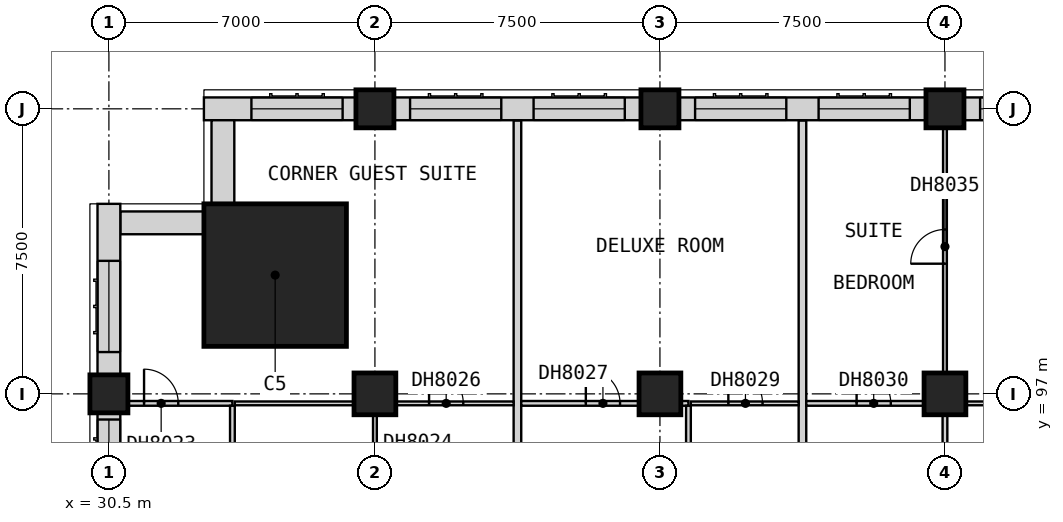
"""IFC4 building model, lengths in metres.
Left out: names, types, materials, properties, quantities, classifications, styles, units other than length and angle.
Written with IfcOpenShell. Run it as: python <this file> out.ifc"""

import sys

from ifc_helpers import new_model, si_unit, direction, frame, frame_2d, origin, origin_2d, place, context, subcontext, project, spatial, rectangle, extrude, element, fill, save


model = new_model("IFC4")
c1 = context("Model", 3, precision=1e-05, world=origin(), true_north=direction((0.0, 1.0)))
c2 = subcontext(c1, "Body", "Model", "MODEL_VIEW")
j1 = project(units=[si_unit("LENGTHUNIT", "METRE"), si_unit("PLANEANGLEUNIT", "RADIAN")], contexts=[c1])
p1 = place(None, origin())
s1 = spatial("IfcSite", under=j1, at=p1, CompositionType="ELEMENT")
p2 = place(p1, origin())
s2 = spatial("IfcBuilding", under=s1, at=p2, CompositionType="ELEMENT")
p3 = place(p2, frame((0.0, 0.0, 89.9)))
s3 = spatial("IfcBuildingStorey", under=s2, at=p3, CompositionType="ELEMENT", Elevation=89.9)
p4 = place(p3, frame((30.5, 97.0, 0.0), z_axis=(0.0, 0.0, 1.0), x_axis=(1.0, 0.0, 0.0)))
e1 = element("IfcColumn", 1, at=p4, inside=s3, PredefinedType="COLUMN", context=c2, shape_type="SweptSolid", body=[
    extrude(rectangle(XDim=1.0, YDim=1.0, at=origin_2d()), origin(), (0.0, 0.0, 1.0), 3.6),
])
p5 = place(p3, frame((37.5, 97.0, 0.0), z_axis=(0.0, 0.0, 1.0), x_axis=(1.0, 0.0, 0.0)))
e2 = element("IfcColumn", 2, at=p5, inside=s3, PredefinedType="COLUMN", context=c2, shape_type="SweptSolid", body=[
    extrude(rectangle(XDim=1.1, YDim=1.1, at=origin_2d()), origin(), (0.0, 0.0, 1.0), 3.6),
])
p6 = place(p3, frame((37.5, 104.5, 0.0), z_axis=(0.0, 0.0, 1.0), x_axis=(1.0, 0.0, 0.0)))
e3 = element("IfcColumn", 3, at=p6, inside=s3, PredefinedType="COLUMN", context=c2, shape_type="SweptSolid", body=[
    extrude(rectangle(XDim=1.0, YDim=1.0, at=origin_2d()), origin(), (0.0, 0.0, 1.0), 3.6),
])
p7 = place(p3, frame((45.0, 97.0, 0.0), z_axis=(0.0, 0.0, 1.0), x_axis=(1.0, 0.0, 0.0)))
e4 = element("IfcColumn", 4, at=p7, inside=s3, PredefinedType="COLUMN", context=c2, shape_type="SweptSolid", body=[
    extrude(rectangle(XDim=1.1, YDim=1.1, at=origin_2d()), origin(), (0.0, 0.0, 1.0), 3.6),
])
p8 = place(p3, frame((45.0, 104.5, 0.0), z_axis=(0.0, 0.0, 1.0), x_axis=(1.0, 0.0, 0.0)))
e5 = element("IfcColumn", 5, at=p8, inside=s3, PredefinedType="COLUMN", context=c2, shape_type="SweptSolid", body=[
    extrude(rectangle(XDim=1.0, YDim=1.0, at=origin_2d()), origin(), (0.0, 0.0, 1.0), 3.6),
])
p9 = place(p3, frame((52.5, 97.0, 0.0), z_axis=(0.0, 0.0, 1.0), x_axis=(1.0, 0.0, 0.0)))
e6 = element("IfcColumn", 6, at=p9, inside=s3, PredefinedType="COLUMN", context=c2, shape_type="SweptSolid", body=[
    extrude(rectangle(XDim=1.1, YDim=1.1, at=origin_2d()), origin(), (0.0, 0.0, 1.0), 3.6),
])
p10 = place(p3, frame((52.5, 104.5, 0.0), z_axis=(0.0, 0.0, 1.0), x_axis=(1.0, 0.0, 0.0)))
e7 = element("IfcColumn", 7, at=p10, inside=s3, PredefinedType="COLUMN", context=c2, shape_type="SweptSolid", body=[
    extrude(rectangle(XDim=1.0, YDim=1.0, at=origin_2d()), origin(), (0.0, 0.0, 1.0), 3.6),
])
p11 = place(p3, frame((34.875, 100.125, 0.0), z_axis=(0.0, 0.0, 1.0), x_axis=(1.0, 0.0, 0.0)))
e8 = element("IfcColumn", 8, at=p11, inside=s3, PredefinedType="COLUMN", context=c2, shape_type="SweptSolid", body=[
    extrude(rectangle(XDim=3.75, YDim=3.75, at=origin_2d()), origin(), (0.0, 0.0, 1.0), 3.6),
])
p12 = place(p3, frame((59.5, 104.5, 0.0), z_axis=(0.0, 0.0, 1.0), x_axis=(-1.0, 0.0, 0.0)))
e9 = element("IfcWall", 9, at=p12, inside=s3, PredefinedType="SOLIDWALL", context=c2, shape_type="SweptSolid", body=[
    extrude(rectangle(XDim=6.5, YDim=0.6, at=frame_2d((3.25, 0.0))), origin(), (0.0, 0.0, 1.0), 2.85),
])
p13 = place(p12, frame((3.675, 0.0, 0.8)))
e10 = element("IfcOpeningElement", 10, at=p13, cuts=e9, PredefinedType="OPENING", context=c2, shape_type="SweptSolid", body=[
    extrude(rectangle(XDim=2.4, YDim=1.8, at=frame_2d((1.2, 0.9))), frame((0.0, 0.31, 0.0), z_axis=(0.0, -1.0, 0.0), x_axis=(1.0, 0.0, 0.0)), (0.0, 0.0, 1.0), 0.62),
])
p14 = place(p12, frame((0.425, 0.0, 0.8)))
e11 = element("IfcOpeningElement", 11, at=p14, cuts=e9, PredefinedType="OPENING", context=c2, shape_type="SweptSolid", body=[
    extrude(rectangle(XDim=2.4, YDim=1.8, at=frame_2d((1.2, 0.9))), frame((0.0, 0.31, 0.0), z_axis=(0.0, -1.0, 0.0), x_axis=(1.0, 0.0, 0.0)), (0.0, 0.0, 1.0), 0.62),
])
p15 = place(p3, frame((52.0, 104.5, 0.0), z_axis=(0.0, 0.0, 1.0), x_axis=(-1.0, 0.0, 0.0)))
e12 = element("IfcWall", 12, at=p15, inside=s3, PredefinedType="SOLIDWALL", context=c2, shape_type="SweptSolid", body=[
    extrude(rectangle(XDim=6.5, YDim=0.6, at=frame_2d((3.25, 0.0))), origin(), (0.0, 0.0, 1.0), 2.85),
])
p16 = place(p15, frame((3.675, 0.0, 0.8)))
e13 = element("IfcOpeningElement", 13, at=p16, cuts=e12, PredefinedType="OPENING", context=c2, shape_type="SweptSolid", body=[
    extrude(rectangle(XDim=2.4, YDim=1.8, at=frame_2d((1.2, 0.9))), frame((0.0, 0.31, 0.0), z_axis=(0.0, -1.0, 0.0), x_axis=(1.0, 0.0, 0.0)), (0.0, 0.0, 1.0), 0.62),
])
p17 = place(p15, frame((0.425, 0.0, 0.8)))
e14 = element("IfcOpeningElement", 14, at=p17, cuts=e12, PredefinedType="OPENING", context=c2, shape_type="SweptSolid", body=[
    extrude(rectangle(XDim=2.4, YDim=1.8, at=frame_2d((1.2, 0.9))), frame((0.0, 0.31, 0.0), z_axis=(0.0, -1.0, 0.0), x_axis=(1.0, 0.0, 0.0)), (0.0, 0.0, 1.0), 0.62),
])
p18 = place(p3, frame((44.5, 104.5, 0.0), z_axis=(0.0, 0.0, 1.0), x_axis=(-1.0, 0.0, 0.0)))
e15 = element("IfcWall", 15, at=p18, inside=s3, PredefinedType="SOLIDWALL", context=c2, shape_type="SweptSolid", body=[
    extrude(rectangle(XDim=6.5, YDim=0.6, at=frame_2d((3.25, 0.0))), origin(), (0.0, 0.0, 1.0), 2.85),
])
p19 = place(p18, frame((3.675, 0.0, 0.8)))
e16 = element("IfcOpeningElement", 16, at=p19, cuts=e15, PredefinedType="OPENING", context=c2, shape_type="SweptSolid", body=[
    extrude(rectangle(XDim=2.4, YDim=1.8, at=frame_2d((1.2, 0.9))), frame((0.0, 0.31, 0.0), z_axis=(0.0, -1.0, 0.0), x_axis=(1.0, 0.0, 0.0)), (0.0, 0.0, 1.0), 0.62),
])
p20 = place(p18, frame((0.425, 0.0, 0.8)))
e17 = element("IfcOpeningElement", 17, at=p20, cuts=e15, PredefinedType="OPENING", context=c2, shape_type="SweptSolid", body=[
    extrude(rectangle(XDim=2.4, YDim=1.8, at=frame_2d((1.2, 0.9))), frame((0.0, 0.31, 0.0), z_axis=(0.0, -1.0, 0.0), x_axis=(1.0, 0.0, 0.0)), (0.0, 0.0, 1.0), 0.62),
])
p21 = place(p3, frame((37.0, 104.5, 0.0), z_axis=(0.0, 0.0, 1.0), x_axis=(-1.0, 0.0, 0.0)))
e18 = element("IfcWall", 18, at=p21, inside=s3, PredefinedType="SOLIDWALL", context=c2, shape_type="SweptSolid", body=[
    extrude(rectangle(XDim=4.0, YDim=0.6, at=frame_2d((2.0, 0.0))), origin(), (0.0, 0.0, 1.0), 3.35),
])
p22 = place(p21, frame((0.35, 0.0, 0.8)))
e19 = element("IfcOpeningElement", 19, at=p22, cuts=e18, PredefinedType="OPENING", context=c2, shape_type="SweptSolid", body=[
    extrude(rectangle(XDim=2.4, YDim=1.8, at=frame_2d((1.2, 0.9))), frame((0.0, 0.31, 0.0), z_axis=(0.0, -1.0, 0.0), x_axis=(1.0, 0.0, 0.0)), (0.0, 0.0, 1.0), 0.62),
])
for number, where, z_axis, x_axis in (
    (20, (33.5, 104.2, 0.0), (0.0, 0.0, 1.0), (0.0, -1.0, 0.0)),
    (21, (33.0, 101.5, 0.0), (0.0, 0.0, 1.0), (-1.0, 0.0, 0.0)),
):
    element("IfcWall", number, at=place(p3, frame(where, z_axis=z_axis, x_axis=x_axis)), inside=s3, PredefinedType="SOLIDWALL", context=c2, shape_type="SweptSolid", body=[
        extrude(rectangle(XDim=2.2, YDim=0.6, at=frame_2d((1.1, 0.0))), origin(), (0.0, 0.0, 1.0), 3.35),
    ])
p23 = place(p3, frame((30.5, 102.0, 0.0), z_axis=(0.0, 0.0, 1.0), x_axis=(0.0, -1.0, 0.0)))
e22 = element("IfcWall", 22, at=p23, inside=s3, PredefinedType="SOLIDWALL", context=c2, shape_type="SweptSolid", body=[
    extrude(rectangle(XDim=4.5, YDim=0.6, at=frame_2d((2.25, 0.0))), origin(), (0.0, 0.0, 1.0), 2.85),
])
p24 = place(p23, frame((1.5, 0.0, 0.8)))
e23 = element("IfcOpeningElement", 23, at=p24, cuts=e22, PredefinedType="OPENING", context=c2, shape_type="SweptSolid", body=[
    extrude(rectangle(XDim=2.4, YDim=1.8, at=frame_2d((1.2, 0.9))), frame((0.0, 0.31, 0.0), z_axis=(0.0, -1.0, 0.0), x_axis=(1.0, 0.0, 0.0)), (0.0, 0.0, 1.0), 0.62),
])
p25 = place(p3, frame((30.5, 96.5, 0.0), z_axis=(0.0, 0.0, 1.0), x_axis=(0.0, -1.0, 0.0)))
e24 = element("IfcWall", 24, at=p25, inside=s3, PredefinedType="SOLIDWALL", context=c2, shape_type="SweptSolid", body=[
    extrude(rectangle(XDim=6.0, YDim=0.6, at=frame_2d((3.0, 0.0))), origin(), (0.0, 0.0, 1.0), 2.85),
])
p26 = place(p25, frame((3.175, 0.0, 0.8)))
e25 = element("IfcOpeningElement", 25, at=p26, cuts=e24, PredefinedType="OPENING", context=c2, shape_type="SweptSolid", body=[
    extrude(rectangle(XDim=2.4, YDim=1.8, at=frame_2d((1.2, 0.9))), frame((0.0, 0.31, 0.0), z_axis=(0.0, -1.0, 0.0), x_axis=(1.0, 0.0, 0.0)), (0.0, 0.0, 1.0), 0.62),
])
p27 = place(p25, frame((0.175, 0.0, 0.8)))
e26 = element("IfcOpeningElement", 26, at=p27, cuts=e24, PredefinedType="OPENING", context=c2, shape_type="SweptSolid", body=[
    extrude(rectangle(XDim=2.4, YDim=1.8, at=frame_2d((1.2, 0.9))), frame((0.0, 0.31, 0.0), z_axis=(0.0, -1.0, 0.0), x_axis=(1.0, 0.0, 0.0)), (0.0, 0.0, 1.0), 0.62),
])
for number, where, z_axis, x_axis in (
    (27, (41.25, 92.475, 0.0), (0.0, 0.0, 1.0), (0.0, 1.0, 0.0)),
    (28, (48.75, 92.475, 0.0), (0.0, 0.0, 1.0), (0.0, 1.0, 0.0)),
):
    element("IfcWall", number, at=place(p3, frame(where, z_axis=z_axis, x_axis=x_axis)), inside=s3, PredefinedType="PARTITIONING", context=c2, shape_type="SweptSolid", body=[
        extrude(rectangle(XDim=11.715, YDim=0.2, at=frame_2d((5.857, 0.0))), origin(), (0.0, 0.0, 1.0), 3.35),
    ])
p28 = place(p3, frame((33.812, 96.75, 0.0), z_axis=(0.0, 0.0, 1.0), x_axis=(1.0, 0.0, 0.0)))
e29 = element("IfcWall", 29, at=p28, inside=s3, PredefinedType="PARTITIONING", context=c2, shape_type="SweptSolid", body=[
    extrude(rectangle(XDim=7.337, YDim=0.1, at=frame_2d((3.669, 0.0))), origin(), (0.0, 0.0, 1.0), 3.35),
])
p29 = place(p28, frame((5.113, 0.0, 0.0)))
e30 = element("IfcOpeningElement", 30, at=p29, cuts=e29, PredefinedType="OPENING", context=c2, shape_type="SweptSolid", body=[
    extrude(rectangle(XDim=0.9, YDim=2.1, at=frame_2d((0.45, 1.05))), frame((0.0, 0.06, 0.0), z_axis=(0.0, -1.0, 0.0), x_axis=(1.0, 0.0, 0.0)), (0.0, 0.0, 1.0), 0.12),
])
p30 = place(p3, frame((45.812, 96.75, 0.0), z_axis=(0.0, 0.0, 1.0), x_axis=(1.0, 0.0, 0.0)))
e31 = element("IfcWall", 31, at=p30, inside=s3, PredefinedType="PARTITIONING", context=c2, shape_type="SweptSolid", body=[
    extrude(rectangle(XDim=2.837, YDim=0.1, at=frame_2d((1.419, 0.0))), origin(), (0.0, 0.0, 1.0), 3.35),
])
p31 = place(p30, frame((0.988, 0.0, 0.0)))
e32 = element("IfcOpeningElement", 32, at=p31, cuts=e31, PredefinedType="OPENING", context=c2, shape_type="SweptSolid", body=[
    extrude(rectangle(XDim=0.9, YDim=2.1, at=frame_2d((0.45, 1.05))), frame((0.0, 0.06, 0.0), z_axis=(0.0, -1.0, 0.0), x_axis=(1.0, 0.0, 0.0)), (0.0, 0.0, 1.0), 0.12),
])
p32 = place(p3, frame((52.562, 96.75, 0.0), z_axis=(0.0, 0.0, 1.0), x_axis=(1.0, 0.0, 0.0)))
e33 = element("IfcWall", 33, at=p32, inside=s3, PredefinedType="PARTITIONING", context=c2, shape_type="SweptSolid", body=[
    extrude(rectangle(XDim=4.375, YDim=0.1, at=frame_2d((2.188, 0.0))), origin(), (0.0, 0.0, 1.0), 3.35),
])
p33 = place(p32, frame((1.738, 0.0, 0.0)))
e34 = element("IfcOpeningElement", 34, at=p33, cuts=e33, PredefinedType="OPENING", context=c2, shape_type="SweptSolid", body=[
    extrude(rectangle(XDim=0.9, YDim=2.1, at=frame_2d((0.45, 1.05))), frame((0.0, 0.06, 0.0), z_axis=(0.0, -1.0, 0.0), x_axis=(1.0, 0.0, 0.0)), (0.0, 0.0, 1.0), 0.12),
])
p34 = place(p3, frame((37.5, 92.475, 0.0), z_axis=(0.0, 0.0, 1.0), x_axis=(0.0, 1.0, 0.0)))
e35 = element("IfcWall", 35, at=p34, inside=s3, PredefinedType="PARTITIONING", context=c2, shape_type="SweptSolid", body=[
    extrude(rectangle(XDim=4.225, YDim=0.1, at=frame_2d((2.112, 0.0))), origin(), (0.0, 0.0, 1.0), 3.35),
])
p35 = place(p34, frame((1.65, 0.0, 0.0)))
e36 = element("IfcOpeningElement", 36, at=p35, cuts=e35, PredefinedType="OPENING", context=c2, shape_type="SweptSolid", body=[
    extrude(rectangle(XDim=0.9, YDim=2.1, at=frame_2d((0.45, 1.05))), frame((0.0, 0.06, 0.0), z_axis=(0.0, -1.0, 0.0), x_axis=(1.0, 0.0, 0.0)), (0.0, 0.0, 1.0), 0.12),
])
p36 = place(p3, frame((52.5, 96.812, 0.0), z_axis=(0.0, 0.0, 1.0), x_axis=(0.0, 1.0, 0.0)))
e37 = element("IfcWall", 37, at=p36, inside=s3, PredefinedType="PARTITIONING", context=c2, shape_type="SweptSolid", body=[
    extrude(rectangle(XDim=8.188, YDim=0.1, at=frame_2d((4.094, 0.0))), origin(), (0.0, 0.0, 1.0), 3.35),
])
p37 = place(p36, frame((3.613, 0.0, 0.0)))
e38 = element("IfcOpeningElement", 38, at=p37, cuts=e37, PredefinedType="OPENING", context=c2, shape_type="SweptSolid", body=[
    extrude(rectangle(XDim=0.9, YDim=2.1, at=frame_2d((0.45, 1.05))), frame((0.0, 0.06, 0.0), z_axis=(0.0, -1.0, 0.0), x_axis=(1.0, 0.0, 0.0)), (0.0, 0.0, 1.0), 0.12),
])
p38 = place(p3, frame((30.0, 96.75, 0.0), z_axis=(0.0, 0.0, 1.0), x_axis=(1.0, 0.0, 0.0)))
e39 = element("IfcWall", 39, at=p38, inside=s3, PredefinedType="PARTITIONING", context=c2, shape_type="SweptSolid", body=[
    extrude(rectangle(XDim=3.75, YDim=0.125, at=frame_2d((1.875, 0.0))), origin(), (0.0, 0.0, 1.0), 3.35),
])
p39 = place(p38, frame((1.425, 0.0, 0.0)))
e40 = element("IfcOpeningElement", 40, at=p39, cuts=e39, PredefinedType="OPENING", context=c2, shape_type="SweptSolid", body=[
    extrude(rectangle(XDim=0.9, YDim=2.1, at=frame_2d((0.45, 1.05))), frame((0.0, 0.073, 0.0), z_axis=(0.0, -1.0, 0.0), x_axis=(1.0, 0.0, 0.0)), (0.0, 0.0, 1.0), 0.145),
])
p40 = place(p3, frame((41.35, 96.75, 0.0), z_axis=(0.0, 0.0, 1.0), x_axis=(1.0, 0.0, 0.0)))
e41 = element("IfcWall", 41, at=p40, inside=s3, PredefinedType="PARTITIONING", context=c2, shape_type="SweptSolid", body=[
    extrude(rectangle(XDim=4.4, YDim=0.125, at=frame_2d((2.2, 0.0))), origin(), (0.0, 0.0, 1.0), 3.35),
])
p41 = place(p40, frame((1.7, 0.0, 0.0)))
e42 = element("IfcOpeningElement", 42, at=p41, cuts=e41, PredefinedType="OPENING", context=c2, shape_type="SweptSolid", body=[
    extrude(rectangle(XDim=0.9, YDim=2.1, at=frame_2d((0.45, 1.05))), frame((0.0, 0.073, 0.0), z_axis=(0.0, -1.0, 0.0), x_axis=(1.0, 0.0, 0.0)), (0.0, 0.0, 1.0), 0.145),
])
p42 = place(p3, frame((48.85, 96.75, 0.0), z_axis=(0.0, 0.0, 1.0), x_axis=(1.0, 0.0, 0.0)))
e43 = element("IfcWall", 43, at=p42, inside=s3, PredefinedType="PARTITIONING", context=c2, shape_type="SweptSolid", body=[
    extrude(rectangle(XDim=3.65, YDim=0.125, at=frame_2d((1.825, 0.0))), origin(), (0.0, 0.0, 1.0), 3.35),
])
p43 = place(p42, frame((1.325, 0.0, 0.0)))
e44 = element("IfcOpeningElement", 44, at=p43, cuts=e43, PredefinedType="OPENING", context=c2, shape_type="SweptSolid", body=[
    extrude(rectangle(XDim=0.9, YDim=2.1, at=frame_2d((0.45, 1.05))), frame((0.0, 0.073, 0.0), z_axis=(0.0, -1.0, 0.0), x_axis=(1.0, 0.0, 0.0)), (0.0, 0.0, 1.0), 0.145),
])
for number, where, z_axis, x_axis in (
    (45, (33.75, 92.475, 0.0), (0.0, 0.0, 1.0), (0.0, 1.0, 0.0)),
    (46, (45.75, 92.475, 0.0), (0.0, 0.0, 1.0), (0.0, 1.0, 0.0)),
    (47, (52.5, 92.475, 0.0), (0.0, 0.0, 1.0), (0.0, 1.0, 0.0)),
):
    element("IfcWall", number, at=place(p3, frame(where, z_axis=z_axis, x_axis=x_axis)), inside=s3, PredefinedType="PARTITIONING", context=c2, shape_type="SweptSolid", body=[
        extrude(rectangle(XDim=4.212, YDim=0.125, at=frame_2d((2.106, 0.0))), origin(), (0.0, 0.0, 1.0), 3.35),
    ])
p44 = place(p13, origin())
e48 = element("IfcWindow", 48, at=p44, inside=s3, PartitioningType="SINGLE_PANEL", PredefinedType="WINDOW", context=c2, shape_type="SweptSolid", body=[
    extrude(rectangle(XDim=2.4, YDim=1.8, at=frame_2d((1.2, 0.9))), frame((0.0, -0.07, 0.0), z_axis=(0.0, -1.0, 0.0), x_axis=(1.0, 0.0, 0.0)), (0.0, 0.0, 1.0), 0.06),
])
fill(e10, e48)
p45 = place(p16, origin())
e49 = element("IfcWindow", 49, at=p45, inside=s3, PartitioningType="SINGLE_PANEL", PredefinedType="WINDOW", context=c2, shape_type="SweptSolid", body=[
    extrude(rectangle(XDim=2.4, YDim=1.8, at=frame_2d((1.2, 0.9))), frame((0.0, -0.07, 0.0), z_axis=(0.0, -1.0, 0.0), x_axis=(1.0, 0.0, 0.0)), (0.0, 0.0, 1.0), 0.06),
])
fill(e13, e49)
p46 = place(p17, origin())
e50 = element("IfcWindow", 50, at=p46, inside=s3, PartitioningType="SINGLE_PANEL", PredefinedType="WINDOW", context=c2, shape_type="SweptSolid", body=[
    extrude(rectangle(XDim=2.4, YDim=1.8, at=frame_2d((1.2, 0.9))), frame((0.0, -0.07, 0.0), z_axis=(0.0, -1.0, 0.0), x_axis=(1.0, 0.0, 0.0)), (0.0, 0.0, 1.0), 0.06),
])
fill(e14, e50)
p47 = place(p19, origin())
e51 = element("IfcWindow", 51, at=p47, inside=s3, PartitioningType="SINGLE_PANEL", PredefinedType="WINDOW", context=c2, shape_type="SweptSolid", body=[
    extrude(rectangle(XDim=2.4, YDim=1.8, at=frame_2d((1.2, 0.9))), frame((0.0, -0.07, 0.0), z_axis=(0.0, -1.0, 0.0), x_axis=(1.0, 0.0, 0.0)), (0.0, 0.0, 1.0), 0.06),
])
fill(e16, e51)
p48 = place(p20, origin())
e52 = element("IfcWindow", 52, at=p48, inside=s3, PartitioningType="SINGLE_PANEL", PredefinedType="WINDOW", context=c2, shape_type="SweptSolid", body=[
    extrude(rectangle(XDim=2.4, YDim=1.8, at=frame_2d((1.2, 0.9))), frame((0.0, -0.07, 0.0), z_axis=(0.0, -1.0, 0.0), x_axis=(1.0, 0.0, 0.0)), (0.0, 0.0, 1.0), 0.06),
])
fill(e17, e52)
p49 = place(p22, origin())
e53 = element("IfcWindow", 53, at=p49, inside=s3, PartitioningType="SINGLE_PANEL", PredefinedType="WINDOW", context=c2, shape_type="SweptSolid", body=[
    extrude(rectangle(XDim=2.4, YDim=1.8, at=frame_2d((1.2, 0.9))), frame((0.0, -0.07, 0.0), z_axis=(0.0, -1.0, 0.0), x_axis=(1.0, 0.0, 0.0)), (0.0, 0.0, 1.0), 0.06),
])
fill(e19, e53)
p50 = place(p24, origin())
e54 = element("IfcWindow", 54, at=p50, inside=s3, PartitioningType="SINGLE_PANEL", PredefinedType="WINDOW", context=c2, shape_type="SweptSolid", body=[
    extrude(rectangle(XDim=2.4, YDim=1.8, at=frame_2d((1.2, 0.9))), frame((0.0, -0.07, 0.0), z_axis=(0.0, -1.0, 0.0), x_axis=(1.0, 0.0, 0.0)), (0.0, 0.0, 1.0), 0.06),
])
fill(e23, e54)
p51 = place(p27, origin())
e55 = element("IfcWindow", 55, at=p51, inside=s3, PartitioningType="SINGLE_PANEL", PredefinedType="WINDOW", context=c2, shape_type="SweptSolid", body=[
    extrude(rectangle(XDim=2.4, YDim=1.8, at=frame_2d((1.2, 0.9))), frame((0.0, -0.07, 0.0), z_axis=(0.0, -1.0, 0.0), x_axis=(1.0, 0.0, 0.0)), (0.0, 0.0, 1.0), 0.06),
])
fill(e26, e55)
p52 = place(p39, origin())
e56 = element("IfcDoor", 56, at=p52, inside=s3, OperationType="SINGLE_SWING_RIGHT", PredefinedType="DOOR", context=c2, shape_type="SweptSolid", body=[
    extrude(rectangle(XDim=0.9, YDim=2.1, at=frame_2d((0.45, 1.05))), frame((0.0, 0.025, 0.0), z_axis=(0.0, -1.0, 0.0), x_axis=(1.0, 0.0, 0.0)), (0.0, 0.0, 1.0), 0.05),
])
fill(e40, e56)
p53 = place(p29, origin())
e57 = element("IfcDoor", 57, at=p53, inside=s3, OperationType="SINGLE_SWING_RIGHT", PredefinedType="DOOR", context=c2, shape_type="SweptSolid", body=[
    extrude(rectangle(XDim=0.9, YDim=2.1, at=frame_2d((0.45, 1.05))), frame((0.0, 0.025, 0.0), z_axis=(0.0, -1.0, 0.0), x_axis=(1.0, 0.0, 0.0)), (0.0, 0.0, 1.0), 0.05),
])
fill(e30, e57)
p54 = place(p41, origin())
e58 = element("IfcDoor", 58, at=p54, inside=s3, OperationType="SINGLE_SWING_RIGHT", PredefinedType="DOOR", context=c2, shape_type="SweptSolid", body=[
    extrude(rectangle(XDim=0.9, YDim=2.1, at=frame_2d((0.45, 1.05))), frame((0.0, 0.025, 0.0), z_axis=(0.0, -1.0, 0.0), x_axis=(1.0, 0.0, 0.0)), (0.0, 0.0, 1.0), 0.05),
])
fill(e42, e58)
p55 = place(p31, origin())
e59 = element("IfcDoor", 59, at=p55, inside=s3, OperationType="SINGLE_SWING_RIGHT", PredefinedType="DOOR", context=c2, shape_type="SweptSolid", body=[
    extrude(rectangle(XDim=0.9, YDim=2.1, at=frame_2d((0.45, 1.05))), frame((0.0, 0.025, 0.0), z_axis=(0.0, -1.0, 0.0), x_axis=(1.0, 0.0, 0.0)), (0.0, 0.0, 1.0), 0.05),
])
fill(e32, e59)
p56 = place(p43, origin())
e60 = element("IfcDoor", 60, at=p56, inside=s3, OperationType="SINGLE_SWING_RIGHT", PredefinedType="DOOR", context=c2, shape_type="SweptSolid", body=[
    extrude(rectangle(XDim=0.9, YDim=2.1, at=frame_2d((0.45, 1.05))), frame((0.0, 0.025, 0.0), z_axis=(0.0, -1.0, 0.0), x_axis=(1.0, 0.0, 0.0)), (0.0, 0.0, 1.0), 0.05),
])
fill(e44, e60)
p57 = place(p37, origin())
e61 = element("IfcDoor", 61, at=p57, inside=s3, OperationType="SINGLE_SWING_LEFT", PredefinedType="DOOR", context=c2, shape_type="SweptSolid", body=[
    extrude(rectangle(XDim=0.9, YDim=2.1, at=frame_2d((0.45, 1.05))), frame((0.0, 0.025, 0.0), z_axis=(0.0, -1.0, 0.0), x_axis=(1.0, 0.0, 0.0)), (0.0, 0.0, 1.0), 0.05),
])
fill(e38, e61)
save(model, sys.argv[1])
